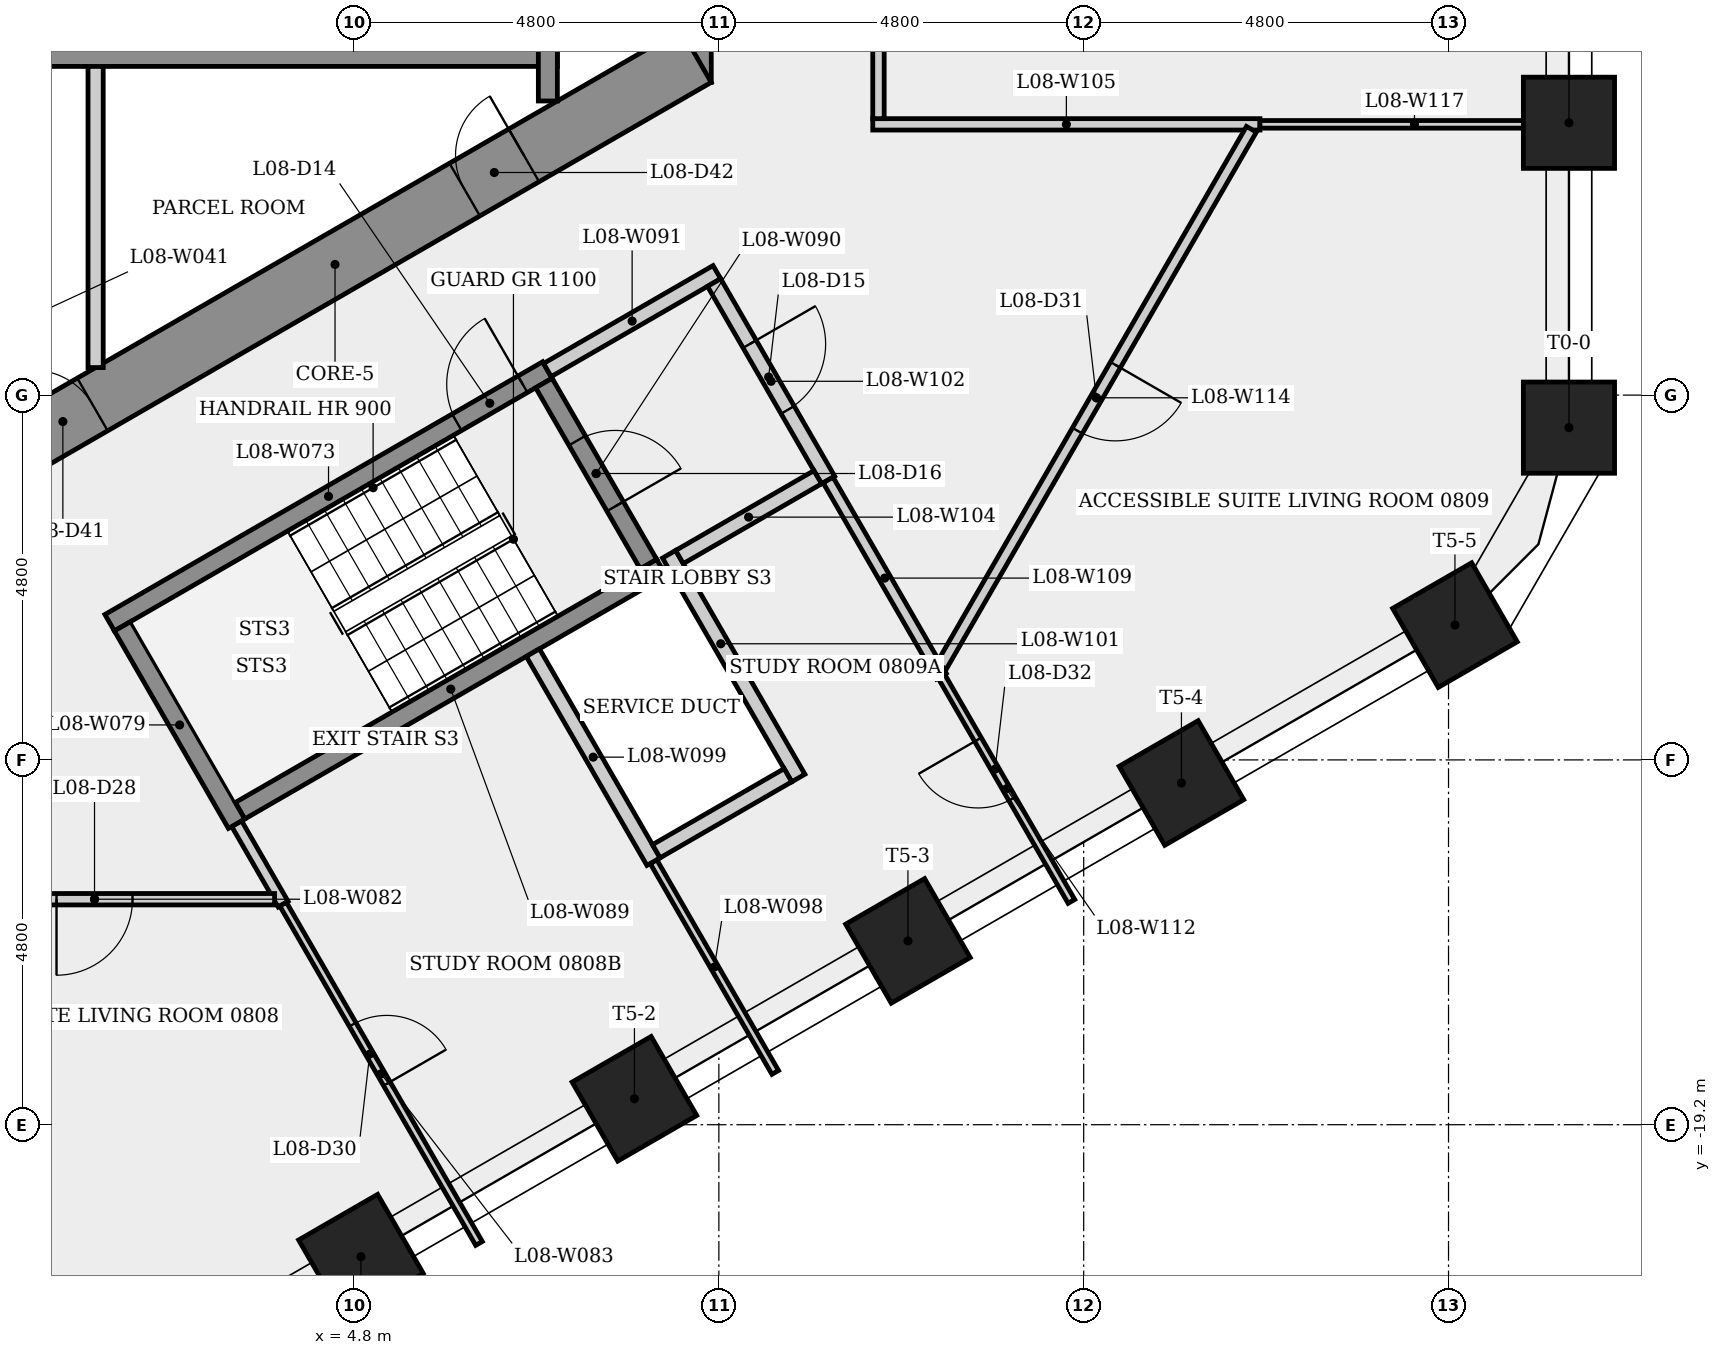
"""IFC4 building model, lengths in metres.
Left out: names, types, materials, properties, quantities, classifications, styles, units other than length and angle.
Written with IfcOpenShell. Run it as: python <this file> out.ifc"""

import sys

from ifc_helpers import new_model, si_unit, direction, frame, frame_2d, origin, origin_2d, place, context, subcontext, project, spatial, rectangle, extrude, element, fill, save


model = new_model("IFC4")
c1 = context("Model", 3, precision=1e-05, world=origin(), true_north=direction((0.0, 1.0)))
c2 = subcontext(c1, "Body", "Model", "MODEL_VIEW")
j1 = project(units=[si_unit("LENGTHUNIT", "METRE"), si_unit("PLANEANGLEUNIT", "RADIAN")], contexts=[c1])
p1 = place(None, origin())
s1 = spatial("IfcSite", under=j1, at=p1, CompositionType="ELEMENT")
p2 = place(p1, origin())
s2 = spatial("IfcBuilding", under=s1, at=p2, CompositionType="ELEMENT")
p3 = place(p2, frame((0.0, 0.0, 35.7)))
s3 = spatial("IfcBuildingStorey", under=s2, at=p3, CompositionType="ELEMENT", Elevation=35.7)
p4 = place(p3, frame((9.1, -5.485, 0.0), z_axis=(0.0, 0.0, 1.0), x_axis=(0.0, 1.0, 0.0)))
e1 = element("IfcWall", 1, at=p4, inside=s3, PredefinedType="SHEAR", context=c2, shape_type="SweptSolid", body=[
    extrude(rectangle(XDim=10.97, YDim=0.8, at=frame_2d((5.485, 0.0))), origin(), (0.0, 0.0, 1.0), 3.4),
])
p5 = place(p4, frame((4.685, 0.0, 0.0)))
e2 = element("IfcOpeningElement", 2, at=p5, cuts=e1, PredefinedType="OPENING", context=c2, shape_type="SweptSolid", body=[
    extrude(rectangle(XDim=1.6, YDim=2.1, at=frame_2d((0.8, 1.05))), frame((0.0, 0.41, 0.0), z_axis=(0.0, -1.0, 0.0), x_axis=(1.0, 0.0, 0.0)), (0.0, 0.0, 1.0), 0.82),
])
p6 = place(p3, frame((-0.2, -10.623, 0.0), z_axis=(0.0, 0.0, 1.0), x_axis=(0.866023993627, 0.500002442456, 0.0)))
e3 = element("IfcWall", 3, at=p6, inside=s3, PredefinedType="SHEAR", context=c2, shape_type="SweptSolid", body=[
    extrude(rectangle(XDim=10.97, YDim=0.8, at=frame_2d((5.485, 0.0))), origin(), (0.0, 0.0, 1.0), 3.4),
])
p7 = place(p6, frame((0.9, 0.0, 0.0)))
e4 = element("IfcOpeningElement", 4, at=p7, cuts=e3, PredefinedType="OPENING", context=c2, shape_type="SweptSolid", body=[
    extrude(rectangle(XDim=0.9, YDim=2.1, at=frame_2d((0.45, 1.05))), frame((0.0, 0.41, 0.0), z_axis=(0.0, -1.0, 0.0), x_axis=(1.0, 0.0, 0.0)), (0.0, 0.0, 1.0), 0.82),
])
p8 = place(p6, frame((7.455, 0.0, 0.0)))
e5 = element("IfcOpeningElement", 5, at=p8, cuts=e3, PredefinedType="OPENING", context=c2, shape_type="SweptSolid", body=[
    extrude(rectangle(XDim=0.9, YDim=2.1, at=frame_2d((0.45, 1.05))), frame((0.0, 0.41, 0.0), z_axis=(0.0, -1.0, 0.0), x_axis=(1.0, 0.0, 0.0)), (0.0, 0.0, 1.0), 0.82),
])
for number, where, z_axis, x_axis in (
    (6, (20.785, -10.028, 0.0), (0.0, 0.0, 1.0), (1.0, 0.0, 0.0)),
    (7, (20.785, -6.017, 0.0), (0.0, 0.0, 1.0), (1.0, 0.0, 0.0)),
    (8, (4.891, -20.937, 0.0), (0.0, 0.0, 1.0), (0.5, -0.866, 0.0)),
    (9, (8.489, -18.859, 0.0), (0.0, 0.0, 1.0), (0.5, -0.866, 0.0)),
    (10, (12.088, -16.781, 0.0), (0.0, 0.0, 1.0), (0.5, -0.866, 0.0)),
    (11, (15.686, -14.704, 0.0), (0.0, 0.0, 1.0), (0.5, -0.866, 0.0)),
    (12, (19.285, -12.626, 0.0), (0.0, 0.0, 1.0), (0.5, -0.866, 0.0)),
):
    element("IfcColumn", number, at=place(p3, frame(where, z_axis=z_axis, x_axis=x_axis)), inside=s3, PredefinedType="COLUMN", context=c2, shape_type="SweptSolid", body=[
        extrude(rectangle(XDim=1.2, YDim=1.2, at=origin_2d()), origin(), (0.0, 0.0, 1.0), 3.4),
    ])
p9 = place(p3, frame((-7.225, -5.15, 0.0), z_axis=(0.0, 0.0, 1.0), x_axis=(1.0, 0.0, 0.0)))
e13 = element("IfcWall", 13, at=p9, inside=s3, PredefinedType="SHEAR", context=c2, shape_type="SweptSolid", body=[
    extrude(rectangle(XDim=14.7, YDim=0.25, at=frame_2d((7.35, 0.0))), origin(), (0.0, 0.0, 1.0), 3.05),
])
p10 = place(p3, frame((1.4, -5.275, 0.0), z_axis=(0.0, 0.0, 1.0), x_axis=(0.0, -1.0, 0.0)))
e14 = element("IfcWall", 14, at=p10, inside=s3, PredefinedType="PARTITIONING", context=c2, shape_type="SweptSolid", body=[
    extrude(rectangle(XDim=3.963, YDim=0.2, at=frame_2d((1.981, 0.0))), origin(), (0.0, 0.0, 1.0), 3.05),
])
p11 = place(p3, frame((1.585, -12.595, 0.0), z_axis=(0.0, 0.0, 1.0), x_axis=(0.866036417653, 0.499980922934, 0.0)))
e15 = element("IfcWall", 15, at=p11, inside=s3, PredefinedType="SHEAR", context=c2, shape_type="SweptSolid", body=[
    extrude(rectangle(XDim=6.65, YDim=0.25, at=frame_2d((3.325, 0.0))), origin(), (0.0, 0.0, 1.0), 3.05),
])
p12 = place(p11, frame((5.275, 0.0, 0.0)))
e16 = element("IfcOpeningElement", 16, at=p12, cuts=e15, PredefinedType="OPENING", context=c2, shape_type="SweptSolid", body=[
    extrude(rectangle(XDim=1.0, YDim=2.1, at=frame_2d((0.5, 1.05))), frame((0.0, 0.135, 0.0), z_axis=(0.0, -1.0, 0.0), x_axis=(1.0, 0.0, 0.0)), (0.0, 0.0, 1.0), 0.27),
])
p13 = place(p3, frame((3.256, -15.239, 0.0), z_axis=(0.0, 0.0, 1.0), x_axis=(0.499981614633, -0.866036018321, 0.0)))
e17 = element("IfcWall", 17, at=p13, inside=s3, PredefinedType="PARTITIONING", context=c2, shape_type="SweptSolid", body=[
    extrude(rectangle(XDim=1.223, YDim=0.15, at=frame_2d((0.612, 0.0))), origin(), (0.0, 0.0, 1.0), 3.05),
])
p14 = place(p3, frame((3.256, -15.239, 0.0), z_axis=(0.0, 0.0, 1.0), x_axis=(-0.50002537861, 0.866010750942, 0.0)))
e18 = element("IfcWall", 18, at=p14, inside=s3, PredefinedType="SHEAR", context=c2, shape_type="SweptSolid", body=[
    extrude(rectangle(XDim=3.0, YDim=0.25, at=frame_2d((1.5, 0.0))), origin(), (0.0, 0.0, 1.0), 3.05),
])
p15 = place(p3, frame((3.755, -16.233, 0.0), z_axis=(0.0, 0.0, 1.0), x_axis=(-1.0, 0.0, 0.0)))
e19 = element("IfcWall", 19, at=p15, inside=s3, PredefinedType="PARTITIONING", context=c2, shape_type="SweptSolid", body=[
    extrude(rectangle(XDim=4.738, YDim=0.15, at=frame_2d((2.369, 0.0))), origin(), (0.0, 0.0, 1.0), 3.05),
])
p16 = place(p15, frame((1.869, 0.0, 0.0)))
e20 = element("IfcOpeningElement", 20, at=p16, cuts=e19, PredefinedType="OPENING", context=c2, shape_type="SweptSolid", body=[
    extrude(rectangle(XDim=1.0, YDim=2.1, at=frame_2d((0.5, 1.05))), frame((0.0, 0.085, 0.0), z_axis=(0.0, -1.0, 0.0), x_axis=(1.0, 0.0, 0.0)), (0.0, 0.0, 1.0), 0.17),
])
p17 = place(p3, frame((3.867, -16.298, 0.0), z_axis=(0.0, 0.0, 1.0), x_axis=(0.499990325971, -0.866030989016, 0.0)))
e21 = element("IfcWall", 21, at=p17, inside=s3, PredefinedType="PARTITIONING", context=c2, shape_type="SweptSolid", body=[
    extrude(rectangle(XDim=5.154, YDim=0.1, at=frame_2d((2.577, 0.0))), origin(), (0.0, 0.0, 1.0), 3.05),
])
p18 = place(p17, frame((1.829, 0.0, 0.0)))
e22 = element("IfcOpeningElement", 22, at=p18, cuts=e21, PredefinedType="OPENING", context=c2, shape_type="SweptSolid", body=[
    extrude(rectangle(XDim=0.9, YDim=2.1, at=frame_2d((0.45, 1.05))), frame((0.0, 0.06, 0.0), z_axis=(0.0, -1.0, 0.0), x_axis=(1.0, 0.0, 0.0)), (0.0, 0.0, 1.0), 0.12),
])
p19 = place(p3, frame((3.301, -15.068, 0.0), z_axis=(0.0, 0.0, 1.0), x_axis=(0.866035036182, 0.499983315828, 0.0)))
e23 = element("IfcWall", 23, at=p19, inside=s3, PredefinedType="SHEAR", context=c2, shape_type="SweptSolid", body=[
    extrude(rectangle(XDim=6.4, YDim=0.25, at=frame_2d((3.2, 0.0))), origin(), (0.0, 0.0, 1.0), 3.05),
])
p20 = place(p3, frame((7.298, -9.441, 0.0), z_axis=(0.0, 0.0, 1.0), x_axis=(0.500034990121, -0.866005201286, 0.0)))
e24 = element("IfcWall", 24, at=p20, inside=s3, PredefinedType="SHEAR", context=c2, shape_type="SweptSolid", body=[
    extrude(rectangle(XDim=2.75, YDim=0.25, at=frame_2d((1.375, 0.0))), origin(), (0.0, 0.0, 1.0), 3.05),
])
p21 = place(p20, frame((0.875, 0.0, 0.0)))
e25 = element("IfcOpeningElement", 25, at=p21, cuts=e24, PredefinedType="OPENING", context=c2, shape_type="SweptSolid", body=[
    extrude(rectangle(XDim=1.0, YDim=2.1, at=frame_2d((0.5, 1.05))), frame((0.0, 0.135, 0.0), z_axis=(0.0, -1.0, 0.0), x_axis=(1.0, 0.0, 0.0)), (0.0, 0.0, 1.0), 0.27),
])
p22 = place(p3, frame((7.344, -9.27, 0.0), z_axis=(0.0, 0.0, 1.0), x_axis=(0.866005588531, 0.500034319456, 0.0)))
e26 = element("IfcWall", 26, at=p22, inside=s3, PredefinedType="PARTITIONING", context=c2, shape_type="SweptSolid", body=[
    extrude(rectangle(XDim=2.575, YDim=0.2, at=frame_2d((1.288, 0.0))), origin(), (0.0, 0.0, 1.0), 3.05),
])
p23 = place(p3, frame((7.35, -1.925, 0.0), z_axis=(0.0, 0.0, 1.0), x_axis=(0.0, -1.0, 0.0)))
e27 = element("IfcWall", 27, at=p23, inside=s3, PredefinedType="SHEAR", context=c2, shape_type="SweptSolid", body=[
    extrude(rectangle(XDim=3.805, YDim=0.25, at=frame_2d((1.903, 0.0))), origin(), (0.0, 0.0, 1.0), 3.05),
])
p24 = place(p3, frame((8.74, -15.738, 0.0), z_axis=(0.0, 0.0, 1.0), x_axis=(0.500041366709, -0.866001519387, 0.0)))
e28 = element("IfcWall", 28, at=p24, inside=s3, PredefinedType="PARTITIONING", context=c2, shape_type="SweptSolid", body=[
    extrude(rectangle(XDim=3.203, YDim=0.1, at=frame_2d((1.602, 0.0))), origin(), (0.0, 0.0, 1.0), 3.05),
])
p25 = place(p3, frame((8.74, -15.739, 0.0), z_axis=(0.0, 0.0, 1.0), x_axis=(-0.500017526161, 0.866015284814, 0.0)))
e29 = element("IfcWall", 29, at=p25, inside=s3, PredefinedType="PLUMBINGWALL", context=c2, shape_type="SweptSolid", body=[
    extrude(rectangle(XDim=3.175, YDim=0.2, at=frame_2d((1.588, 0.0))), origin(), (0.0, 0.0, 1.0), 3.05),
])
p26 = place(p3, frame((8.945, -11.694, 0.0), z_axis=(0.0, 0.0, 1.0), x_axis=(0.500062241894, -0.865989465428, 0.0)))
e30 = element("IfcWall", 30, at=p26, inside=s3, PredefinedType="PLUMBINGWALL", context=c2, shape_type="SweptSolid", body=[
    extrude(rectangle(XDim=3.4, YDim=0.2, at=frame_2d((1.7, 0.0))), origin(), (0.0, 0.0, 1.0), 3.05),
])
p27 = place(p3, frame((9.537, -8.119, 0.0), z_axis=(0.0, 0.0, 1.0), x_axis=(0.499990139034, -0.866031096941, 0.0)))
e31 = element("IfcWall", 31, at=p27, inside=s3, PredefinedType="PARTITIONING", context=c2, shape_type="SweptSolid", body=[
    extrude(rectangle(XDim=3.0, YDim=0.2, at=frame_2d((1.5, 0.0))), origin(), (0.0, 0.0, 1.0), 3.05),
])
p28 = place(p27, frame((0.935, 0.0, 0.0)))
e32 = element("IfcOpeningElement", 32, at=p28, cuts=e31, PredefinedType="OPENING", context=c2, shape_type="SweptSolid", body=[
    extrude(rectangle(XDim=1.0, YDim=2.1, at=frame_2d((0.5, 1.05))), frame((0.0, 0.11, 0.0), z_axis=(0.0, -1.0, 0.0), x_axis=(1.0, 0.0, 0.0)), (0.0, 0.0, 1.0), 0.22),
])
p29 = place(p3, frame((10.509, -14.602, 0.0), z_axis=(0.0, 0.0, 1.0), x_axis=(-0.866010750942, -0.50002537861, 0.0)))
e33 = element("IfcWall", 33, at=p29, inside=s3, PredefinedType="PLUMBINGWALL", context=c2, shape_type="SweptSolid", body=[
    extrude(rectangle(XDim=2.0, YDim=0.2, at=frame_2d((1.0, 0.0))), origin(), (0.0, 0.0, 1.0), 3.05),
])
p30 = place(p3, frame((10.901, -10.681, 0.0), z_axis=(0.0, 0.0, 1.0), x_axis=(-0.866009402589, -0.500027713859, 0.0)))
e34 = element("IfcWall", 34, at=p30, inside=s3, PredefinedType="PARTITIONING", context=c2, shape_type="SweptSolid", body=[
    extrude(rectangle(XDim=2.1, YDim=0.2, at=frame_2d((1.05, 0.0))), origin(), (0.0, 0.0, 1.0), 3.05),
])
p31 = place(p3, frame((11.625, -6.037, 0.0), z_axis=(0.0, 0.0, 1.0), x_axis=(1.0, 0.0, 0.0)))
e35 = element("IfcWall", 35, at=p31, inside=s3, PredefinedType="PARTITIONING", context=c2, shape_type="SweptSolid", body=[
    extrude(rectangle(XDim=5.094, YDim=0.15, at=frame_2d((2.547, 0.0))), origin(), (0.0, 0.0, 1.0), 3.05),
])
p32 = place(p3, frame((11.7, -5.962, 0.0), z_axis=(0.0, 0.0, 1.0), x_axis=(0.0, 1.0, 0.0)))
e36 = element("IfcWall", 36, at=p32, inside=s3, PredefinedType="PARTITIONING", context=c2, shape_type="SweptSolid", body=[
    extrude(rectangle(XDim=12.0, YDim=0.15, at=frame_2d((6.0, 0.0))), origin(), (0.0, 0.0, 1.0), 3.05),
])
p33 = place(p32, frame((2.949, 0.0, 0.0)))
e37 = element("IfcOpeningElement", 37, at=p33, cuts=e36, PredefinedType="OPENING", context=c2, shape_type="SweptSolid", body=[
    extrude(rectangle(XDim=1.0, YDim=2.1, at=frame_2d((0.5, 1.05))), frame((0.0, 0.085, 0.0), z_axis=(0.0, -1.0, 0.0), x_axis=(1.0, 0.0, 0.0)), (0.0, 0.0, 1.0), 0.17),
])
p34 = place(p3, frame((12.527, -13.298, 0.0), z_axis=(0.0, 0.0, 1.0), x_axis=(-0.499954101135, 0.866051901885, 0.0)))
e38 = element("IfcWall", 38, at=p34, inside=s3, PredefinedType="PARTITIONING", context=c2, shape_type="SweptSolid", body=[
    extrude(rectangle(XDim=2.98, YDim=0.15, at=frame_2d((1.49, 0.0))), origin(), (0.0, 0.0, 1.0), 3.05),
])
p35 = place(p3, frame((14.239, -16.262, 0.0), z_axis=(0.0, 0.0, 1.0), x_axis=(-0.499998273584, 0.866026400529, 0.0)))
e39 = element("IfcWall", 39, at=p35, inside=s3, PredefinedType="PARTITIONING", context=c2, shape_type="SweptSolid", body=[
    extrude(rectangle(XDim=3.422, YDim=0.1, at=frame_2d((1.711, 0.0))), origin(), (0.0, 0.0, 1.0), 3.05),
])
p36 = place(p35, frame((1.559, 0.0, 0.0)))
e40 = element("IfcOpeningElement", 40, at=p36, cuts=e39, PredefinedType="OPENING", context=c2, shape_type="SweptSolid", body=[
    extrude(rectangle(XDim=0.9, YDim=2.1, at=frame_2d((0.45, 1.05))), frame((0.0, 0.06, 0.0), z_axis=(0.0, -1.0, 0.0), x_axis=(1.0, 0.0, 0.0)), (0.0, 0.0, 1.0), 0.12),
])
p37 = place(p3, frame((16.607, -6.102, 0.0), z_axis=(0.0, 0.0, 1.0), x_axis=(-0.499984930112, -0.866034104213, 0.0)))
e41 = element("IfcWall", 41, at=p37, inside=s3, PredefinedType="PARTITIONING", context=c2, shape_type="SweptSolid", body=[
    extrude(rectangle(XDim=8.159, YDim=0.15, at=frame_2d((4.08, 0.0))), origin(), (0.0, 0.0, 1.0), 3.05),
])
p38 = place(p37, frame((3.579, 0.0, 0.0)))
e42 = element("IfcOpeningElement", 42, at=p38, cuts=e41, PredefinedType="OPENING", context=c2, shape_type="SweptSolid", body=[
    extrude(rectangle(XDim=1.0, YDim=2.1, at=frame_2d((0.5, 1.05))), frame((0.0, 0.085, 0.0), z_axis=(0.0, -1.0, 0.0), x_axis=(1.0, 0.0, 0.0)), (0.0, 0.0, 1.0), 0.17),
])
p39 = place(p3, frame((20.785, -6.037, 0.0), z_axis=(0.0, 0.0, 1.0), x_axis=(-1.0, 0.0, 0.0)))
e43 = element("IfcWall", 43, at=p39, inside=s3, PredefinedType="PARTITIONING", context=c2, shape_type="SweptSolid", body=[
    extrude(rectangle(XDim=4.065, YDim=0.1, at=frame_2d((2.033, 0.0))), origin(), (0.0, 0.0, 1.0), 3.05),
])
p40 = place(p12, origin())
e44 = element("IfcDoor", 44, at=p40, inside=s3, OperationType="SINGLE_SWING_RIGHT", PredefinedType="DOOR", context=c2, shape_type="SweptSolid", body=[
    extrude(rectangle(XDim=1.0, YDim=2.1, at=frame_2d((0.5, 1.05))), frame((0.0, 0.025, 0.0), z_axis=(0.0, -1.0, 0.0), x_axis=(1.0, 0.0, 0.0)), (0.0, 0.0, 1.0), 0.05),
])
fill(e16, e44)
p41 = place(p28, origin())
e45 = element("IfcDoor", 45, at=p41, inside=s3, OperationType="SINGLE_SWING_LEFT", PredefinedType="DOOR", context=c2, shape_type="SweptSolid", body=[
    extrude(rectangle(XDim=1.0, YDim=2.1, at=frame_2d((0.5, 1.05))), frame((0.0, 0.025, 0.0), z_axis=(0.0, -1.0, 0.0), x_axis=(1.0, 0.0, 0.0)), (0.0, 0.0, 1.0), 0.05),
])
fill(e32, e45)
p42 = place(p21, origin())
e46 = element("IfcDoor", 46, at=p42, inside=s3, OperationType="SINGLE_SWING_RIGHT", PredefinedType="DOOR", context=c2, shape_type="SweptSolid", body=[
    extrude(rectangle(XDim=1.0, YDim=2.1, at=frame_2d((0.5, 1.05))), frame((0.0, 0.025, 0.0), z_axis=(0.0, -1.0, 0.0), x_axis=(1.0, 0.0, 0.0)), (0.0, 0.0, 1.0), 0.05),
])
fill(e25, e46)
p43 = place(p16, origin())
e47 = element("IfcDoor", 47, at=p43, inside=s3, OperationType="SINGLE_SWING_RIGHT", PredefinedType="DOOR", context=c2, shape_type="SweptSolid", body=[
    extrude(rectangle(XDim=1.0, YDim=2.1, at=frame_2d((0.5, 1.05))), frame((0.0, 0.025, 0.0), z_axis=(0.0, -1.0, 0.0), x_axis=(1.0, 0.0, 0.0)), (0.0, 0.0, 1.0), 0.05),
])
fill(e20, e47)
p44 = place(p18, origin())
e48 = element("IfcDoor", 48, at=p44, inside=s3, OperationType="SINGLE_SWING_RIGHT", PredefinedType="DOOR", context=c2, shape_type="SweptSolid", body=[
    extrude(rectangle(XDim=0.9, YDim=2.1, at=frame_2d((0.45, 1.05))), frame((0.0, 0.025, 0.0), z_axis=(0.0, -1.0, 0.0), x_axis=(1.0, 0.0, 0.0)), (0.0, 0.0, 1.0), 0.05),
])
fill(e22, e48)
p45 = place(p38, origin())
e49 = element("IfcDoor", 49, at=p45, inside=s3, OperationType="SINGLE_SWING_LEFT", PredefinedType="DOOR", context=c2, shape_type="SweptSolid", body=[
    extrude(rectangle(XDim=1.0, YDim=2.1, at=frame_2d((0.5, 1.05))), frame((0.0, 0.025, 0.0), z_axis=(0.0, -1.0, 0.0), x_axis=(1.0, 0.0, 0.0)), (0.0, 0.0, 1.0), 0.05),
])
fill(e42, e49)
p46 = place(p36, origin())
e50 = element("IfcDoor", 50, at=p46, inside=s3, OperationType="SINGLE_SWING_RIGHT", PredefinedType="DOOR", context=c2, shape_type="SweptSolid", body=[
    extrude(rectangle(XDim=0.9, YDim=2.1, at=frame_2d((0.45, 1.05))), frame((0.0, 0.025, 0.0), z_axis=(0.0, -1.0, 0.0), x_axis=(1.0, 0.0, 0.0)), (0.0, 0.0, 1.0), 0.05),
])
fill(e40, e50)
p47 = place(p7, origin())
e51 = element("IfcDoor", 51, at=p47, inside=s3, OperationType="SINGLE_SWING_LEFT", PredefinedType="DOOR", context=c2, shape_type="SweptSolid", body=[
    extrude(rectangle(XDim=0.9, YDim=2.1, at=frame_2d((0.45, 1.05))), frame((0.0, 0.025, 0.0), z_axis=(0.0, -1.0, 0.0), x_axis=(1.0, 0.0, 0.0)), (0.0, 0.0, 1.0), 0.05),
])
fill(e4, e51)
p48 = place(p8, origin())
e52 = element("IfcDoor", 52, at=p48, inside=s3, OperationType="SINGLE_SWING_RIGHT", PredefinedType="DOOR", context=c2, shape_type="SweptSolid", body=[
    extrude(rectangle(XDim=0.9, YDim=2.1, at=frame_2d((0.45, 1.05))), frame((0.0, 0.025, 0.0), z_axis=(0.0, -1.0, 0.0), x_axis=(1.0, 0.0, 0.0)), (0.0, 0.0, 1.0), 0.05),
])
fill(e5, e52)
save(model, sys.argv[1])
